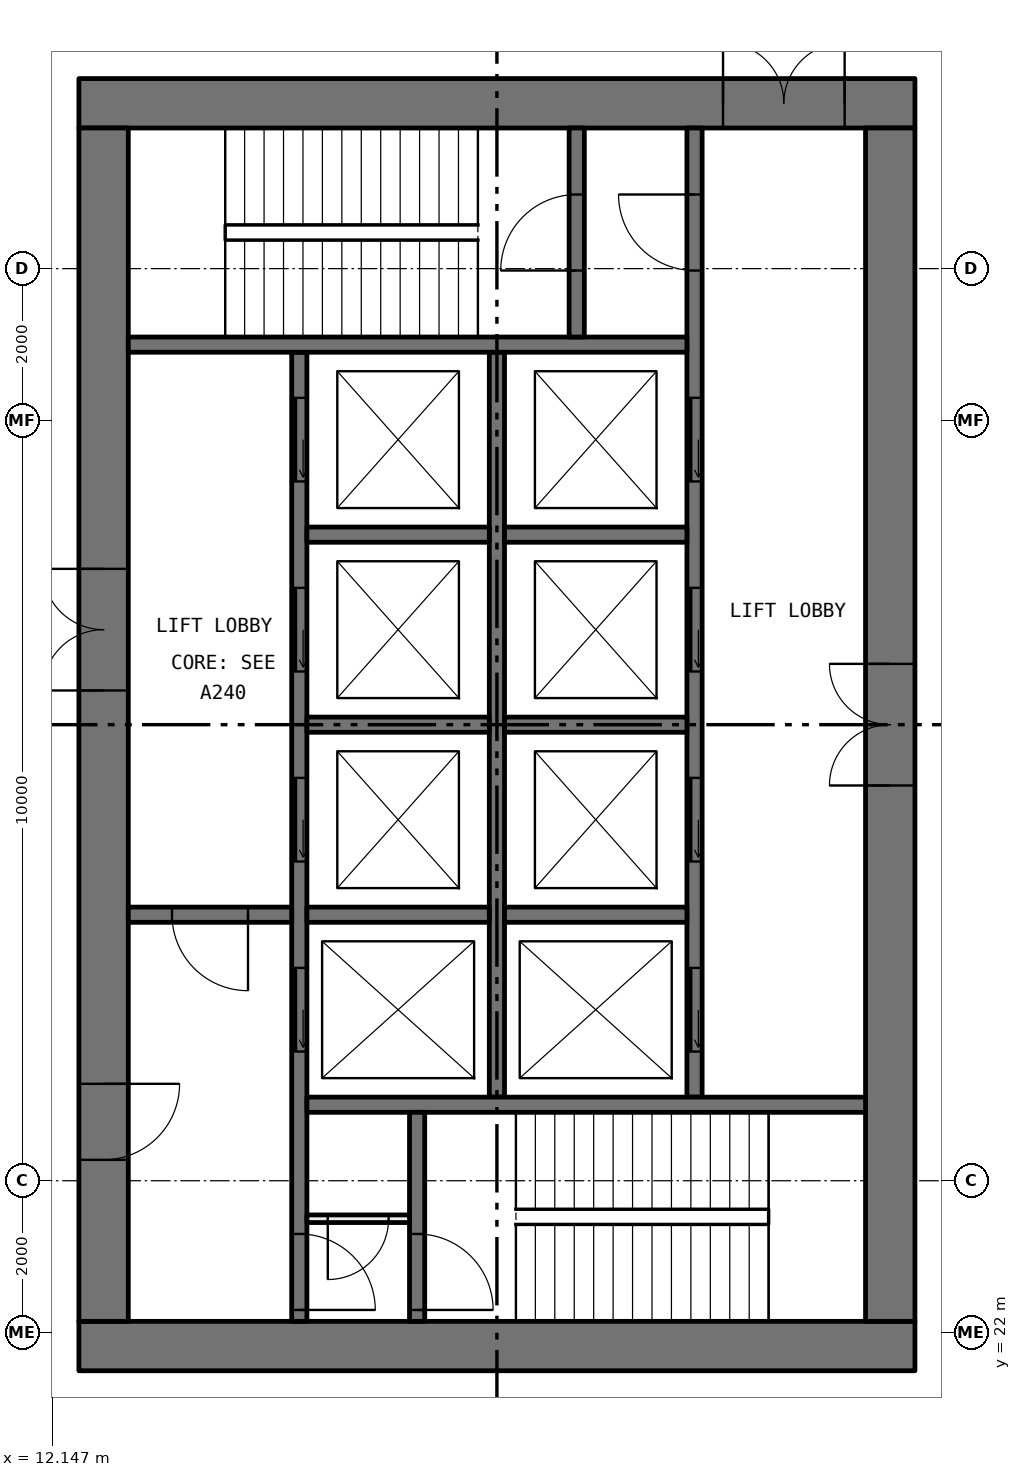
"""IFC4 building model, lengths in metres.
Left out: names, types, materials, properties, quantities, classifications, styles, units other than length and angle.
Written with IfcOpenShell. Run it as: python <this file> out.ifc"""

import sys

from ifc_helpers import new_model, si_unit, direction, frame, frame_2d, origin, place, context, subcontext, project, spatial, rectangle, extrude, element, fill, save


model = new_model("IFC4")
c1 = context("Model", 3, precision=1e-05, world=origin(), true_north=direction((0.0, 1.0)))
c2 = subcontext(c1, "Body", "Model", "MODEL_VIEW")
j1 = project(units=[si_unit("LENGTHUNIT", "METRE"), si_unit("PLANEANGLEUNIT", "RADIAN")], contexts=[c1])
p1 = place(None, origin())
s1 = spatial("IfcSite", under=j1, at=p1, CompositionType="ELEMENT")
p2 = place(p1, origin())
s2 = spatial("IfcBuilding", under=s1, at=p2, CompositionType="ELEMENT")
p3 = place(p2, frame((0.0, 0.0, 148.35)))
s3 = spatial("IfcBuildingStorey", under=s2, at=p3, CompositionType="ELEMENT", Elevation=148.35)
p4 = place(p3, frame((12.5, 21.825, 0.0), z_axis=(0.0, 0.0, 1.0), x_axis=(1.0, 0.0, 0.0)))
e1 = element("IfcWall", 1, at=p4, inside=s3, PredefinedType="SHEAR", context=c2, shape_type="SweptSolid", body=[
    extrude(rectangle(XDim=11.0, YDim=0.65, at=frame_2d((5.5, 0.0))), origin(), (0.0, 0.0, 1.0), 5.0),
])
p5 = place(p3, frame((12.5, 38.175, 0.0), z_axis=(0.0, 0.0, 1.0), x_axis=(1.0, 0.0, 0.0)))
e2 = element("IfcWall", 2, at=p5, inside=s3, PredefinedType="SHEAR", context=c2, shape_type="SweptSolid", body=[
    extrude(rectangle(XDim=11.0, YDim=0.65, at=frame_2d((5.5, 0.0))), origin(), (0.0, 0.0, 1.0), 5.0),
])
p6 = place(p5, frame((8.475, 0.0, 0.0)))
e3 = element("IfcOpeningElement", 3, at=p6, cuts=e2, PredefinedType="OPENING", context=c2, shape_type="SweptSolid", body=[
    extrude(rectangle(XDim=1.6, YDim=2.1, at=frame_2d((0.8, 1.05))), frame((0.0, 0.335, 0.0), z_axis=(0.0, -1.0, 0.0), x_axis=(1.0, 0.0, 0.0)), (0.0, 0.0, 1.0), 0.67),
])
p7 = place(p3, frame((12.825, 22.15, 0.0), z_axis=(0.0, 0.0, 1.0), x_axis=(0.0, 1.0, 0.0)))
e4 = element("IfcWall", 4, at=p7, inside=s3, PredefinedType="SHEAR", context=c2, shape_type="SweptSolid", body=[
    extrude(rectangle(XDim=15.7, YDim=0.65, at=frame_2d((7.85, 0.0))), origin(), (0.0, 0.0, 1.0), 5.0),
])
p8 = place(p7, frame((8.3, 0.0, 0.0)))
e5 = element("IfcOpeningElement", 5, at=p8, cuts=e4, PredefinedType="OPENING", context=c2, shape_type="SweptSolid", body=[
    extrude(rectangle(XDim=1.6, YDim=2.1, at=frame_2d((0.8, 1.05))), frame((0.0, 0.335, 0.0), z_axis=(0.0, -1.0, 0.0), x_axis=(1.0, 0.0, 0.0)), (0.0, 0.0, 1.0), 0.67),
])
p9 = place(p7, frame((2.125, 0.0, 0.0)))
e6 = element("IfcOpeningElement", 6, at=p9, cuts=e4, PredefinedType="OPENING", context=c2, shape_type="SweptSolid", body=[
    extrude(rectangle(XDim=1.0, YDim=2.1, at=frame_2d((0.5, 1.05))), frame((0.0, 0.335, 0.0), z_axis=(0.0, -1.0, 0.0), x_axis=(1.0, 0.0, 0.0)), (0.0, 0.0, 1.0), 0.67),
])
p10 = place(p3, frame((23.175, 22.15, 0.0), z_axis=(0.0, 0.0, 1.0), x_axis=(0.0, 1.0, 0.0)))
e7 = element("IfcWall", 7, at=p10, inside=s3, PredefinedType="SHEAR", context=c2, shape_type="SweptSolid", body=[
    extrude(rectangle(XDim=15.7, YDim=0.65, at=frame_2d((7.85, 0.0))), origin(), (0.0, 0.0, 1.0), 5.0),
])
p11 = place(p10, frame((7.05, 0.0, 0.0)))
e8 = element("IfcOpeningElement", 8, at=p11, cuts=e7, PredefinedType="OPENING", context=c2, shape_type="SweptSolid", body=[
    extrude(rectangle(XDim=1.6, YDim=2.1, at=frame_2d((0.8, 1.05))), frame((0.0, 0.335, 0.0), z_axis=(0.0, -1.0, 0.0), x_axis=(1.0, 0.0, 0.0)), (0.0, 0.0, 1.0), 0.67),
])
p12 = place(p3, frame((15.4, 22.15, 0.0), z_axis=(0.0, 0.0, 1.0), x_axis=(0.0, 1.0, 0.0)))
e9 = element("IfcWall", 9, at=p12, inside=s3, PredefinedType="SOLIDWALL", context=c2, shape_type="SweptSolid", body=[
    extrude(rectangle(XDim=12.75, YDim=0.2, at=frame_2d((6.375, 0.0))), origin(), (0.0, 0.0, 1.0), 5.0),
])
p13 = place(p12, frame((3.55, 0.0, 0.0)))
e10 = element("IfcOpeningElement", 10, at=p13, cuts=e9, PredefinedType="OPENING", context=c2, shape_type="SweptSolid", body=[
    extrude(rectangle(XDim=1.1, YDim=2.1, at=frame_2d((0.55, 1.05))), frame((0.0, 0.11, 0.0), z_axis=(0.0, -1.0, 0.0), x_axis=(1.0, 0.0, 0.0)), (0.0, 0.0, 1.0), 0.22),
])
p14 = place(p12, frame((6.05, 0.0, 0.0)))
e11 = element("IfcOpeningElement", 11, at=p14, cuts=e9, PredefinedType="OPENING", context=c2, shape_type="SweptSolid", body=[
    extrude(rectangle(XDim=1.1, YDim=2.1, at=frame_2d((0.55, 1.05))), frame((0.0, 0.11, 0.0), z_axis=(0.0, -1.0, 0.0), x_axis=(1.0, 0.0, 0.0)), (0.0, 0.0, 1.0), 0.22),
])
p15 = place(p12, frame((8.55, 0.0, 0.0)))
e12 = element("IfcOpeningElement", 12, at=p15, cuts=e9, PredefinedType="OPENING", context=c2, shape_type="SweptSolid", body=[
    extrude(rectangle(XDim=1.1, YDim=2.1, at=frame_2d((0.55, 1.05))), frame((0.0, 0.11, 0.0), z_axis=(0.0, -1.0, 0.0), x_axis=(1.0, 0.0, 0.0)), (0.0, 0.0, 1.0), 0.22),
])
p16 = place(p12, frame((11.05, 0.0, 0.0)))
e13 = element("IfcOpeningElement", 13, at=p16, cuts=e9, PredefinedType="OPENING", context=c2, shape_type="SweptSolid", body=[
    extrude(rectangle(XDim=1.1, YDim=2.1, at=frame_2d((0.55, 1.05))), frame((0.0, 0.11, 0.0), z_axis=(0.0, -1.0, 0.0), x_axis=(1.0, 0.0, 0.0)), (0.0, 0.0, 1.0), 0.22),
])
p17 = place(p12, frame((0.15, 0.0, 0.0)))
e14 = element("IfcOpeningElement", 14, at=p17, cuts=e9, PredefinedType="OPENING", context=c2, shape_type="SweptSolid", body=[
    extrude(rectangle(XDim=1.0, YDim=2.1, at=frame_2d((0.5, 1.05))), frame((0.0, 0.11, 0.0), z_axis=(0.0, -1.0, 0.0), x_axis=(1.0, 0.0, 0.0)), (0.0, 0.0, 1.0), 0.22),
])
p18 = place(p3, frame((20.6, 25.1, 0.0), z_axis=(0.0, 0.0, 1.0), x_axis=(0.0, 1.0, 0.0)))
e15 = element("IfcWall", 15, at=p18, inside=s3, PredefinedType="SOLIDWALL", context=c2, shape_type="SweptSolid", body=[
    extrude(rectangle(XDim=12.75, YDim=0.2, at=frame_2d((6.375, 0.0))), origin(), (0.0, 0.0, 1.0), 5.0),
])
p19 = place(p18, frame((0.6, 0.0, 0.0)))
e16 = element("IfcOpeningElement", 16, at=p19, cuts=e15, PredefinedType="OPENING", context=c2, shape_type="SweptSolid", body=[
    extrude(rectangle(XDim=1.1, YDim=2.1, at=frame_2d((0.55, 1.05))), frame((0.0, 0.11, 0.0), z_axis=(0.0, -1.0, 0.0), x_axis=(1.0, 0.0, 0.0)), (0.0, 0.0, 1.0), 0.22),
])
p20 = place(p18, frame((3.1, 0.0, 0.0)))
e17 = element("IfcOpeningElement", 17, at=p20, cuts=e15, PredefinedType="OPENING", context=c2, shape_type="SweptSolid", body=[
    extrude(rectangle(XDim=1.1, YDim=2.1, at=frame_2d((0.55, 1.05))), frame((0.0, 0.11, 0.0), z_axis=(0.0, -1.0, 0.0), x_axis=(1.0, 0.0, 0.0)), (0.0, 0.0, 1.0), 0.22),
])
p21 = place(p18, frame((5.6, 0.0, 0.0)))
e18 = element("IfcOpeningElement", 18, at=p21, cuts=e15, PredefinedType="OPENING", context=c2, shape_type="SweptSolid", body=[
    extrude(rectangle(XDim=1.1, YDim=2.1, at=frame_2d((0.55, 1.05))), frame((0.0, 0.11, 0.0), z_axis=(0.0, -1.0, 0.0), x_axis=(1.0, 0.0, 0.0)), (0.0, 0.0, 1.0), 0.22),
])
p22 = place(p18, frame((8.1, 0.0, 0.0)))
e19 = element("IfcOpeningElement", 19, at=p22, cuts=e15, PredefinedType="OPENING", context=c2, shape_type="SweptSolid", body=[
    extrude(rectangle(XDim=1.1, YDim=2.1, at=frame_2d((0.55, 1.05))), frame((0.0, 0.11, 0.0), z_axis=(0.0, -1.0, 0.0), x_axis=(1.0, 0.0, 0.0)), (0.0, 0.0, 1.0), 0.22),
])
p23 = place(p18, frame((10.875, 0.0, 0.0)))
e20 = element("IfcOpeningElement", 20, at=p23, cuts=e15, PredefinedType="OPENING", context=c2, shape_type="SweptSolid", body=[
    extrude(rectangle(XDim=1.0, YDim=2.1, at=frame_2d((0.5, 1.05))), frame((0.0, 0.11, 0.0), z_axis=(0.0, -1.0, 0.0), x_axis=(1.0, 0.0, 0.0)), (0.0, 0.0, 1.0), 0.22),
])
p24 = place(p3, frame((18.0, 25.1, 0.0), z_axis=(0.0, 0.0, 1.0), x_axis=(0.0, 1.0, 0.0)))
e21 = element("IfcWall", 21, at=p24, inside=s3, PredefinedType="SOLIDWALL", context=c2, shape_type="SweptSolid", body=[
    extrude(rectangle(XDim=9.8, YDim=0.2, at=frame_2d((4.9, 0.0))), origin(), (0.0, 0.0, 1.0), 5.0),
])
for number, where, z_axis, x_axis in (
    (22, (15.5, 25.0, 0.0), (0.0, 0.0, 1.0), (1.0, 0.0, 0.0)),
    (23, (13.15, 35.0, 0.0), (0.0, 0.0, 1.0), (1.0, 0.0, 0.0)),
):
    element("IfcWall", number, at=place(p3, frame(where, z_axis=z_axis, x_axis=x_axis)), inside=s3, PredefinedType="SOLIDWALL", context=c2, shape_type="SweptSolid", body=[
        extrude(rectangle(XDim=7.35, YDim=0.2, at=frame_2d((3.675, 0.0))), origin(), (0.0, 0.0, 1.0), 5.0),
    ])
p25 = place(p3, frame((13.15, 27.5, 0.0), z_axis=(0.0, 0.0, 1.0), x_axis=(1.0, 0.0, 0.0)))
e24 = element("IfcWall", 24, at=p25, inside=s3, PredefinedType="SOLIDWALL", context=c2, shape_type="SweptSolid", body=[
    extrude(rectangle(XDim=2.15, YDim=0.2, at=frame_2d((1.075, 0.0))), origin(), (0.0, 0.0, 1.0), 5.0),
])
p26 = place(p25, frame((0.575, 0.0, 0.0)))
e25 = element("IfcOpeningElement", 25, at=p26, cuts=e24, PredefinedType="OPENING", context=c2, shape_type="SweptSolid", body=[
    extrude(rectangle(XDim=1.0, YDim=2.1, at=frame_2d((0.5, 1.05))), frame((0.0, 0.11, 0.0), z_axis=(0.0, -1.0, 0.0), x_axis=(1.0, 0.0, 0.0)), (0.0, 0.0, 1.0), 0.22),
])
p27 = place(p3, frame((16.95, 22.15, 0.0), z_axis=(0.0, 0.0, 1.0), x_axis=(0.0, 1.0, 0.0)))
e26 = element("IfcWall", 26, at=p27, inside=s3, PredefinedType="SOLIDWALL", context=c2, shape_type="SweptSolid", body=[
    extrude(rectangle(XDim=2.75, YDim=0.2, at=frame_2d((1.375, 0.0))), origin(), (0.0, 0.0, 1.0), 5.0),
])
p28 = place(p27, frame((0.15, 0.0, 0.0)))
e27 = element("IfcOpeningElement", 27, at=p28, cuts=e26, PredefinedType="OPENING", context=c2, shape_type="SweptSolid", body=[
    extrude(rectangle(XDim=1.0, YDim=2.1, at=frame_2d((0.5, 1.05))), frame((0.0, 0.11, 0.0), z_axis=(0.0, -1.0, 0.0), x_axis=(1.0, 0.0, 0.0)), (0.0, 0.0, 1.0), 0.22),
])
p29 = place(p3, frame((19.05, 35.1, 0.0), z_axis=(0.0, 0.0, 1.0), x_axis=(0.0, 1.0, 0.0)))
e28 = element("IfcWall", 28, at=p29, inside=s3, PredefinedType="SOLIDWALL", context=c2, shape_type="SweptSolid", body=[
    extrude(rectangle(XDim=2.75, YDim=0.2, at=frame_2d((1.375, 0.0))), origin(), (0.0, 0.0, 1.0), 5.0),
])
p30 = place(p29, frame((0.875, 0.0, 0.0)))
e29 = element("IfcOpeningElement", 29, at=p30, cuts=e28, PredefinedType="OPENING", context=c2, shape_type="SweptSolid", body=[
    extrude(rectangle(XDim=1.0, YDim=2.1, at=frame_2d((0.5, 1.05))), frame((0.0, 0.11, 0.0), z_axis=(0.0, -1.0, 0.0), x_axis=(1.0, 0.0, 0.0)), (0.0, 0.0, 1.0), 0.22),
])
for number, where, z_axis, x_axis in (
    (30, (15.5, 27.5, 0.0), (0.0, 0.0, 1.0), (1.0, 0.0, 0.0)),
    (31, (15.5, 30.0, 0.0), (0.0, 0.0, 1.0), (1.0, 0.0, 0.0)),
    (32, (15.5, 32.5, 0.0), (0.0, 0.0, 1.0), (1.0, 0.0, 0.0)),
    (33, (18.1, 27.5, 0.0), (0.0, 0.0, 1.0), (1.0, 0.0, 0.0)),
    (34, (18.1, 30.0, 0.0), (0.0, 0.0, 1.0), (1.0, 0.0, 0.0)),
    (35, (18.1, 32.5, 0.0), (0.0, 0.0, 1.0), (1.0, 0.0, 0.0)),
):
    element("IfcWall", number, at=place(p3, frame(where, z_axis=z_axis, x_axis=x_axis)), inside=s3, PredefinedType="SOLIDWALL", context=c2, shape_type="SweptSolid", body=[
        extrude(rectangle(XDim=2.4, YDim=0.2, at=frame_2d((1.2, 0.0))), origin(), (0.0, 0.0, 1.0), 5.0),
    ])
p31 = place(p3, frame((15.5, 23.5, 0.0), z_axis=(0.0, 0.0, 1.0), x_axis=(1.0, 0.0, 0.0)))
e36 = element("IfcWall", 36, at=p31, inside=s3, PredefinedType="PARTITIONING", context=c2, shape_type="SweptSolid", body=[
    extrude(rectangle(XDim=1.35, YDim=0.1, at=frame_2d((0.675, 0.0))), origin(), (0.0, 0.0, 1.0), 5.0),
])
p32 = place(p31, frame((0.275, 0.0, 0.0)))
e37 = element("IfcOpeningElement", 37, at=p32, cuts=e36, PredefinedType="OPENING", context=c2, shape_type="SweptSolid", body=[
    extrude(rectangle(XDim=0.8, YDim=2.1, at=frame_2d((0.4, 1.05))), frame((0.0, 0.06, 0.0), z_axis=(0.0, -1.0, 0.0), x_axis=(1.0, 0.0, 0.0)), (0.0, 0.0, 1.0), 0.12),
])
p33 = place(p19, origin())
e38 = element("IfcDoor", 38, at=p33, inside=s3, OperationType="SLIDING_TO_LEFT", PredefinedType="DOOR", context=c2, shape_type="SweptSolid", body=[
    extrude(rectangle(XDim=1.1, YDim=2.1, at=frame_2d((0.55, 1.05))), frame((0.0, 0.025, 0.0), z_axis=(0.0, -1.0, 0.0), x_axis=(1.0, 0.0, 0.0)), (0.0, 0.0, 1.0), 0.05),
])
fill(e16, e38)
p34 = place(p20, origin())
e39 = element("IfcDoor", 39, at=p34, inside=s3, OperationType="SLIDING_TO_LEFT", PredefinedType="DOOR", context=c2, shape_type="SweptSolid", body=[
    extrude(rectangle(XDim=1.1, YDim=2.1, at=frame_2d((0.55, 1.05))), frame((0.0, 0.025, 0.0), z_axis=(0.0, -1.0, 0.0), x_axis=(1.0, 0.0, 0.0)), (0.0, 0.0, 1.0), 0.05),
])
fill(e17, e39)
p35 = place(p21, origin())
e40 = element("IfcDoor", 40, at=p35, inside=s3, OperationType="SLIDING_TO_LEFT", PredefinedType="DOOR", context=c2, shape_type="SweptSolid", body=[
    extrude(rectangle(XDim=1.1, YDim=2.1, at=frame_2d((0.55, 1.05))), frame((0.0, 0.025, 0.0), z_axis=(0.0, -1.0, 0.0), x_axis=(1.0, 0.0, 0.0)), (0.0, 0.0, 1.0), 0.05),
])
fill(e18, e40)
p36 = place(p22, origin())
e41 = element("IfcDoor", 41, at=p36, inside=s3, OperationType="SLIDING_TO_LEFT", PredefinedType="DOOR", context=c2, shape_type="SweptSolid", body=[
    extrude(rectangle(XDim=1.1, YDim=2.1, at=frame_2d((0.55, 1.05))), frame((0.0, 0.025, 0.0), z_axis=(0.0, -1.0, 0.0), x_axis=(1.0, 0.0, 0.0)), (0.0, 0.0, 1.0), 0.05),
])
fill(e19, e41)
p37 = place(p13, origin())
e42 = element("IfcDoor", 42, at=p37, inside=s3, OperationType="SLIDING_TO_LEFT", PredefinedType="DOOR", context=c2, shape_type="SweptSolid", body=[
    extrude(rectangle(XDim=1.1, YDim=2.1, at=frame_2d((0.55, 1.05))), frame((0.0, 0.025, 0.0), z_axis=(0.0, -1.0, 0.0), x_axis=(1.0, 0.0, 0.0)), (0.0, 0.0, 1.0), 0.05),
])
fill(e10, e42)
p38 = place(p14, origin())
e43 = element("IfcDoor", 43, at=p38, inside=s3, OperationType="SLIDING_TO_LEFT", PredefinedType="DOOR", context=c2, shape_type="SweptSolid", body=[
    extrude(rectangle(XDim=1.1, YDim=2.1, at=frame_2d((0.55, 1.05))), frame((0.0, 0.025, 0.0), z_axis=(0.0, -1.0, 0.0), x_axis=(1.0, 0.0, 0.0)), (0.0, 0.0, 1.0), 0.05),
])
fill(e11, e43)
p39 = place(p15, origin())
e44 = element("IfcDoor", 44, at=p39, inside=s3, OperationType="SLIDING_TO_LEFT", PredefinedType="DOOR", context=c2, shape_type="SweptSolid", body=[
    extrude(rectangle(XDim=1.1, YDim=2.1, at=frame_2d((0.55, 1.05))), frame((0.0, 0.025, 0.0), z_axis=(0.0, -1.0, 0.0), x_axis=(1.0, 0.0, 0.0)), (0.0, 0.0, 1.0), 0.05),
])
fill(e12, e44)
p40 = place(p16, origin())
e45 = element("IfcDoor", 45, at=p40, inside=s3, OperationType="SLIDING_TO_LEFT", PredefinedType="DOOR", context=c2, shape_type="SweptSolid", body=[
    extrude(rectangle(XDim=1.1, YDim=2.1, at=frame_2d((0.55, 1.05))), frame((0.0, 0.025, 0.0), z_axis=(0.0, -1.0, 0.0), x_axis=(1.0, 0.0, 0.0)), (0.0, 0.0, 1.0), 0.05),
])
fill(e13, e45)
p41 = place(p28, frame((1.0, 0.0, 0.0), x_axis=(-1.0, 0.0, 0.0)))
e46 = element("IfcDoor", 46, at=p41, inside=s3, OperationType="SINGLE_SWING_LEFT", PredefinedType="DOOR", context=c2, shape_type="SweptSolid", body=[
    extrude(rectangle(XDim=1.0, YDim=2.1, at=frame_2d((0.5, 1.05))), frame((0.0, 0.025, 0.0), z_axis=(0.0, -1.0, 0.0), x_axis=(1.0, 0.0, 0.0)), (0.0, 0.0, 1.0), 0.05),
])
fill(e27, e46)
p42 = place(p17, frame((1.0, 0.0, 0.0), x_axis=(-1.0, 0.0, 0.0)))
e47 = element("IfcDoor", 47, at=p42, inside=s3, OperationType="SINGLE_SWING_LEFT", PredefinedType="DOOR", context=c2, shape_type="SweptSolid", body=[
    extrude(rectangle(XDim=1.0, YDim=2.1, at=frame_2d((0.5, 1.05))), frame((0.0, 0.025, 0.0), z_axis=(0.0, -1.0, 0.0), x_axis=(1.0, 0.0, 0.0)), (0.0, 0.0, 1.0), 0.05),
])
fill(e14, e47)
p43 = place(p23, origin())
e48 = element("IfcDoor", 48, at=p43, inside=s3, OperationType="SINGLE_SWING_LEFT", PredefinedType="DOOR", context=c2, shape_type="SweptSolid", body=[
    extrude(rectangle(XDim=1.0, YDim=2.1, at=frame_2d((0.5, 1.05))), frame((0.0, 0.025, 0.0), z_axis=(0.0, -1.0, 0.0), x_axis=(1.0, 0.0, 0.0)), (0.0, 0.0, 1.0), 0.05),
])
fill(e20, e48)
p44 = place(p30, origin())
e49 = element("IfcDoor", 49, at=p44, inside=s3, OperationType="SINGLE_SWING_RIGHT", PredefinedType="DOOR", context=c2, shape_type="SweptSolid", body=[
    extrude(rectangle(XDim=1.0, YDim=2.1, at=frame_2d((0.5, 1.05))), frame((0.0, 0.025, 0.0), z_axis=(0.0, -1.0, 0.0), x_axis=(1.0, 0.0, 0.0)), (0.0, 0.0, 1.0), 0.05),
])
fill(e29, e49)
p45 = place(p26, frame((1.0, 0.0, 0.0), x_axis=(-1.0, 0.0, 0.0)))
e50 = element("IfcDoor", 50, at=p45, inside=s3, OperationType="SINGLE_SWING_RIGHT", PredefinedType="DOOR", context=c2, shape_type="SweptSolid", body=[
    extrude(rectangle(XDim=1.0, YDim=2.1, at=frame_2d((0.5, 1.05))), frame((0.0, 0.025, 0.0), z_axis=(0.0, -1.0, 0.0), x_axis=(1.0, 0.0, 0.0)), (0.0, 0.0, 1.0), 0.05),
])
fill(e25, e50)
p46 = place(p32, frame((0.8, 0.0, 0.0), x_axis=(-1.0, 0.0, 0.0)))
e51 = element("IfcDoor", 51, at=p46, inside=s3, OperationType="SINGLE_SWING_LEFT", PredefinedType="DOOR", context=c2, shape_type="SweptSolid", body=[
    extrude(rectangle(XDim=0.8, YDim=2.1, at=frame_2d((0.4, 1.05))), frame((0.0, 0.025, 0.0), z_axis=(0.0, -1.0, 0.0), x_axis=(1.0, 0.0, 0.0)), (0.0, 0.0, 1.0), 0.05),
])
fill(e37, e51)
p47 = place(p8, origin())
e52 = element("IfcDoor", 52, at=p47, inside=s3, OperationType="DOUBLE_DOOR_SINGLE_SWING", PredefinedType="DOOR", context=c2, shape_type="SweptSolid", body=[
    extrude(rectangle(XDim=1.6, YDim=2.1, at=frame_2d((0.8, 1.05))), frame((0.0, 0.025, 0.0), z_axis=(0.0, -1.0, 0.0), x_axis=(1.0, 0.0, 0.0)), (0.0, 0.0, 1.0), 0.05),
])
fill(e5, e52)
p48 = place(p9, frame((1.0, 0.0, 0.0), x_axis=(-1.0, 0.0, 0.0)))
e53 = element("IfcDoor", 53, at=p48, inside=s3, OperationType="SINGLE_SWING_RIGHT", PredefinedType="DOOR", context=c2, shape_type="SweptSolid", body=[
    extrude(rectangle(XDim=1.0, YDim=2.1, at=frame_2d((0.5, 1.05))), frame((0.0, 0.025, 0.0), z_axis=(0.0, -1.0, 0.0), x_axis=(1.0, 0.0, 0.0)), (0.0, 0.0, 1.0), 0.05),
])
fill(e6, e53)
p49 = place(p6, origin())
e54 = element("IfcDoor", 54, at=p49, inside=s3, OperationType="DOUBLE_DOOR_SINGLE_SWING", PredefinedType="DOOR", context=c2, shape_type="SweptSolid", body=[
    extrude(rectangle(XDim=1.6, YDim=2.1, at=frame_2d((0.8, 1.05))), frame((0.0, 0.025, 0.0), z_axis=(0.0, -1.0, 0.0), x_axis=(1.0, 0.0, 0.0)), (0.0, 0.0, 1.0), 0.05),
])
fill(e3, e54)
p50 = place(p11, origin())
e55 = element("IfcDoor", 55, at=p50, inside=s3, OperationType="DOUBLE_DOOR_SINGLE_SWING", PredefinedType="DOOR", context=c2, shape_type="SweptSolid", body=[
    extrude(rectangle(XDim=1.6, YDim=2.1, at=frame_2d((0.8, 1.05))), frame((0.0, 0.025, 0.0), z_axis=(0.0, -1.0, 0.0), x_axis=(1.0, 0.0, 0.0)), (0.0, 0.0, 1.0), 0.05),
])
fill(e8, e55)
save(model, sys.argv[1])
